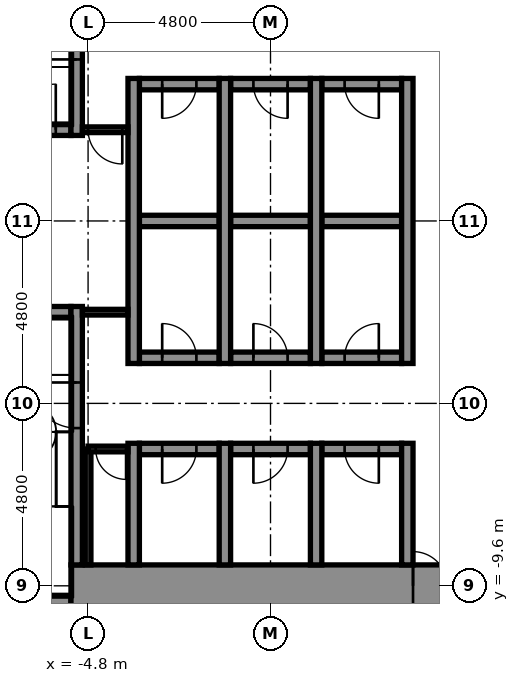
"""IFC4 building model, lengths in metres.
Left out: names, types, materials, properties, quantities, classifications, styles, units other than length and angle.
Written with IfcOpenShell. Run it as: python <this file> out.ifc"""

import sys

from ifc_helpers import new_model, si_unit, direction, frame, frame_2d, origin, place, context, subcontext, project, spatial, rectangle, extrude, element, fill, save


model = new_model("IFC4")
c1 = context("Model", 3, precision=1e-05, world=origin(), true_north=direction((0.0, 1.0)))
c2 = subcontext(c1, "Body", "Model", "MODEL_VIEW")
j1 = project(units=[si_unit("LENGTHUNIT", "METRE"), si_unit("PLANEANGLEUNIT", "RADIAN")], contexts=[c1])
p1 = place(None, origin())
s1 = spatial("IfcSite", under=j1, at=p1, CompositionType="ELEMENT")
p2 = place(p1, origin())
s2 = spatial("IfcBuilding", under=s1, at=p2, CompositionType="ELEMENT")
p3 = place(p2, frame((0.0, 0.0, 7.0)))
s3 = spatial("IfcBuildingStorey", under=s2, at=p3, CompositionType="ELEMENT", Elevation=7.0)
p4 = place(p3, frame((-9.05, -10.0, -0.3), z_axis=(0.0, 0.0, 1.0), x_axis=(1.0, 0.0, 0.0)))
e1 = element("IfcWall", 1, at=p4, inside=s3, PredefinedType="STANDARD", context=c2, shape_type="SweptSolid", body=[
    extrude(rectangle(XDim=3.8, YDim=0.3, at=frame_2d((1.9, 0.0))), origin(), (0.0, 0.0, 1.0), 5.4),
])
p5 = place(p3, frame((-5.25, -9.6, -0.3), z_axis=(0.0, 0.0, 1.0), x_axis=(1.0, 0.0, 0.0)))
e2 = element("IfcWall", 2, at=p5, inside=s3, PredefinedType="SHEAR", context=c2, shape_type="SweptSolid", body=[
    extrude(rectangle(XDim=10.2, YDim=1.1, at=frame_2d((5.1, 0.0))), origin(), (0.0, 0.0, 1.0), 5.4),
])
p6 = place(p5, frame((9.0, 0.0, 0.3)))
e3 = element("IfcOpeningElement", 3, at=p6, cuts=e2, PredefinedType="OPENING", context=c2, shape_type="SweptSolid", body=[
    extrude(rectangle(XDim=0.9, YDim=2.1, at=frame_2d((0.45, 1.05))), frame((0.0, 0.56, 0.0), z_axis=(0.0, -1.0, 0.0), x_axis=(1.0, 0.0, 0.0)), (0.0, 0.0, 1.0), 1.12),
])
p7 = place(p3, frame((-3.45, -6.0, -0.3), z_axis=(0.0, 0.0, 1.0), x_axis=(1.0, 0.0, 0.0)))
e4 = element("IfcWall", 4, at=p7, inside=s3, PredefinedType="STANDARD", context=c2, shape_type="SweptSolid", body=[
    extrude(rectangle(XDim=2.1, YDim=0.3, at=frame_2d((1.05, 0.0))), origin(), (0.0, 0.0, 1.0), 5.4),
])
p8 = place(p7, frame((0.6, 0.0, 0.3)))
e5 = element("IfcOpeningElement", 5, at=p8, cuts=e4, PredefinedType="OPENING", context=c2, shape_type="SweptSolid", body=[
    extrude(rectangle(XDim=0.9, YDim=2.1, at=frame_2d((0.45, 1.05))), frame((0.0, 0.16, 0.0), z_axis=(0.0, -1.0, 0.0), x_axis=(1.0, 0.0, 0.0)), (0.0, 0.0, 1.0), 0.32),
])
p9 = place(p3, frame((-1.05, -6.0, -0.3), z_axis=(0.0, 0.0, 1.0), x_axis=(1.0, 0.0, 0.0)))
e6 = element("IfcWall", 6, at=p9, inside=s3, PredefinedType="STANDARD", context=c2, shape_type="SweptSolid", body=[
    extrude(rectangle(XDim=2.1, YDim=0.3, at=frame_2d((1.05, 0.0))), origin(), (0.0, 0.0, 1.0), 5.4),
])
p10 = place(p9, frame((0.6, 0.0, 0.3)))
e7 = element("IfcOpeningElement", 7, at=p10, cuts=e6, PredefinedType="OPENING", context=c2, shape_type="SweptSolid", body=[
    extrude(rectangle(XDim=0.9, YDim=2.1, at=frame_2d((0.45, 1.05))), frame((0.0, 0.16, 0.0), z_axis=(0.0, -1.0, 0.0), x_axis=(1.0, 0.0, 0.0)), (0.0, 0.0, 1.0), 0.32),
])
p11 = place(p3, frame((1.35, -6.0, -0.3), z_axis=(0.0, 0.0, 1.0), x_axis=(1.0, 0.0, 0.0)))
e8 = element("IfcWall", 8, at=p11, inside=s3, PredefinedType="STANDARD", context=c2, shape_type="SweptSolid", body=[
    extrude(rectangle(XDim=2.1, YDim=0.3, at=frame_2d((1.05, 0.0))), origin(), (0.0, 0.0, 1.0), 5.4),
])
p12 = place(p11, frame((0.6, 0.0, 0.3)))
e9 = element("IfcOpeningElement", 9, at=p12, cuts=e8, PredefinedType="OPENING", context=c2, shape_type="SweptSolid", body=[
    extrude(rectangle(XDim=0.9, YDim=2.1, at=frame_2d((0.45, 1.05))), frame((0.0, 0.16, 0.0), z_axis=(0.0, -1.0, 0.0), x_axis=(1.0, 0.0, 0.0)), (0.0, 0.0, 1.0), 0.32),
])
p13 = place(p3, frame((-3.45, -3.6, -0.3), z_axis=(0.0, 0.0, 1.0), x_axis=(1.0, 0.0, 0.0)))
e10 = element("IfcWall", 10, at=p13, inside=s3, PredefinedType="STANDARD", context=c2, shape_type="SweptSolid", body=[
    extrude(rectangle(XDim=2.1, YDim=0.3, at=frame_2d((1.05, 0.0))), origin(), (0.0, 0.0, 1.0), 5.4),
])
p14 = place(p13, frame((0.6, 0.0, 0.3)))
e11 = element("IfcOpeningElement", 11, at=p14, cuts=e10, PredefinedType="OPENING", context=c2, shape_type="SweptSolid", body=[
    extrude(rectangle(XDim=0.9, YDim=2.1, at=frame_2d((0.45, 1.05))), frame((0.0, 0.16, 0.0), z_axis=(0.0, -1.0, 0.0), x_axis=(1.0, 0.0, 0.0)), (0.0, 0.0, 1.0), 0.32),
])
p15 = place(p3, frame((-1.05, -3.6, -0.3), z_axis=(0.0, 0.0, 1.0), x_axis=(1.0, 0.0, 0.0)))
e12 = element("IfcWall", 12, at=p15, inside=s3, PredefinedType="STANDARD", context=c2, shape_type="SweptSolid", body=[
    extrude(rectangle(XDim=2.1, YDim=0.3, at=frame_2d((1.05, 0.0))), origin(), (0.0, 0.0, 1.0), 5.4),
])
p16 = place(p15, frame((0.6, 0.0, 0.3)))
e13 = element("IfcOpeningElement", 13, at=p16, cuts=e12, PredefinedType="OPENING", context=c2, shape_type="SweptSolid", body=[
    extrude(rectangle(XDim=0.9, YDim=2.1, at=frame_2d((0.45, 1.05))), frame((0.0, 0.16, 0.0), z_axis=(0.0, -1.0, 0.0), x_axis=(1.0, 0.0, 0.0)), (0.0, 0.0, 1.0), 0.32),
])
p17 = place(p3, frame((1.35, -3.6, -0.3), z_axis=(0.0, 0.0, 1.0), x_axis=(1.0, 0.0, 0.0)))
e14 = element("IfcWall", 14, at=p17, inside=s3, PredefinedType="STANDARD", context=c2, shape_type="SweptSolid", body=[
    extrude(rectangle(XDim=2.1, YDim=0.3, at=frame_2d((1.05, 0.0))), origin(), (0.0, 0.0, 1.0), 5.4),
])
p18 = place(p17, frame((0.6, 0.0, 0.3)))
e15 = element("IfcOpeningElement", 15, at=p18, cuts=e14, PredefinedType="OPENING", context=c2, shape_type="SweptSolid", body=[
    extrude(rectangle(XDim=0.9, YDim=2.1, at=frame_2d((0.45, 1.05))), frame((0.0, 0.16, 0.0), z_axis=(0.0, -1.0, 0.0), x_axis=(1.0, 0.0, 0.0)), (0.0, 0.0, 1.0), 0.32),
])
p19 = place(p3, frame((-7.25, -2.4, -0.3), z_axis=(0.0, 0.0, 1.0), x_axis=(1.0, 0.0, 0.0)))
e16 = element("IfcWall", 16, at=p19, inside=s3, PredefinedType="STANDARD", context=c2, shape_type="SweptSolid", body=[
    extrude(rectangle(XDim=2.0, YDim=0.3, at=frame_2d((1.0, 0.0))), origin(), (0.0, 0.0, 1.0), 5.4),
])
p20 = place(p3, frame((-3.45, 0.0, -0.3), z_axis=(0.0, 0.0, 1.0), x_axis=(1.0, 0.0, 0.0)))
e17 = element("IfcWall", 17, at=p20, inside=s3, PredefinedType="STANDARD", context=c2, shape_type="SweptSolid", body=[
    extrude(rectangle(XDim=2.1, YDim=0.3, at=frame_2d((1.05, 0.0))), origin(), (0.0, 0.0, 1.0), 5.4),
])
p21 = place(p3, frame((-1.05, 0.0, -0.3), z_axis=(0.0, 0.0, 1.0), x_axis=(1.0, 0.0, 0.0)))
e18 = element("IfcWall", 18, at=p21, inside=s3, PredefinedType="STANDARD", context=c2, shape_type="SweptSolid", body=[
    extrude(rectangle(XDim=2.1, YDim=0.3, at=frame_2d((1.05, 0.0))), origin(), (0.0, 0.0, 1.0), 5.4),
])
p22 = place(p3, frame((1.35, 0.0, -0.3), z_axis=(0.0, 0.0, 1.0), x_axis=(1.0, 0.0, 0.0)))
e19 = element("IfcWall", 19, at=p22, inside=s3, PredefinedType="STANDARD", context=c2, shape_type="SweptSolid", body=[
    extrude(rectangle(XDim=2.1, YDim=0.3, at=frame_2d((1.05, 0.0))), origin(), (0.0, 0.0, 1.0), 5.4),
])
p23 = place(p3, frame((-7.25, 2.4, -0.3), z_axis=(0.0, 0.0, 1.0), x_axis=(1.0, 0.0, 0.0)))
e20 = element("IfcWall", 20, at=p23, inside=s3, PredefinedType="STANDARD", context=c2, shape_type="SweptSolid", body=[
    extrude(rectangle(XDim=2.0, YDim=0.3, at=frame_2d((1.0, 0.0))), origin(), (0.0, 0.0, 1.0), 5.4),
])
p24 = place(p23, frame((0.4, 0.0, 0.3)))
e21 = element("IfcOpeningElement", 21, at=p24, cuts=e20, PredefinedType="OPENING", context=c2, shape_type="SweptSolid", body=[
    extrude(rectangle(XDim=1.2, YDim=2.1, at=frame_2d((0.6, 1.05))), frame((0.0, 0.16, 0.0), z_axis=(0.0, -1.0, 0.0), x_axis=(1.0, 0.0, 0.0)), (0.0, 0.0, 1.0), 0.32),
])
p25 = place(p3, frame((-3.45, 3.6, -0.3), z_axis=(0.0, 0.0, 1.0), x_axis=(1.0, 0.0, 0.0)))
e22 = element("IfcWall", 22, at=p25, inside=s3, PredefinedType="STANDARD", context=c2, shape_type="SweptSolid", body=[
    extrude(rectangle(XDim=2.1, YDim=0.3, at=frame_2d((1.05, 0.0))), origin(), (0.0, 0.0, 1.0), 5.4),
])
p26 = place(p25, frame((0.6, 0.0, 0.3)))
e23 = element("IfcOpeningElement", 23, at=p26, cuts=e22, PredefinedType="OPENING", context=c2, shape_type="SweptSolid", body=[
    extrude(rectangle(XDim=0.9, YDim=2.1, at=frame_2d((0.45, 1.05))), frame((0.0, 0.16, 0.0), z_axis=(0.0, -1.0, 0.0), x_axis=(1.0, 0.0, 0.0)), (0.0, 0.0, 1.0), 0.32),
])
p27 = place(p3, frame((-1.05, 3.6, -0.3), z_axis=(0.0, 0.0, 1.0), x_axis=(1.0, 0.0, 0.0)))
e24 = element("IfcWall", 24, at=p27, inside=s3, PredefinedType="STANDARD", context=c2, shape_type="SweptSolid", body=[
    extrude(rectangle(XDim=2.1, YDim=0.3, at=frame_2d((1.05, 0.0))), origin(), (0.0, 0.0, 1.0), 5.4),
])
p28 = place(p27, frame((0.6, 0.0, 0.3)))
e25 = element("IfcOpeningElement", 25, at=p28, cuts=e24, PredefinedType="OPENING", context=c2, shape_type="SweptSolid", body=[
    extrude(rectangle(XDim=0.9, YDim=2.1, at=frame_2d((0.45, 1.05))), frame((0.0, 0.16, 0.0), z_axis=(0.0, -1.0, 0.0), x_axis=(1.0, 0.0, 0.0)), (0.0, 0.0, 1.0), 0.32),
])
p29 = place(p3, frame((1.35, 3.6, -0.3), z_axis=(0.0, 0.0, 1.0), x_axis=(1.0, 0.0, 0.0)))
e26 = element("IfcWall", 26, at=p29, inside=s3, PredefinedType="STANDARD", context=c2, shape_type="SweptSolid", body=[
    extrude(rectangle(XDim=2.1, YDim=0.3, at=frame_2d((1.05, 0.0))), origin(), (0.0, 0.0, 1.0), 5.4),
])
p30 = place(p29, frame((0.6, 0.0, 0.3)))
e27 = element("IfcOpeningElement", 27, at=p30, cuts=e26, PredefinedType="OPENING", context=c2, shape_type="SweptSolid", body=[
    extrude(rectangle(XDim=0.9, YDim=2.1, at=frame_2d((0.45, 1.05))), frame((0.0, 0.16, 0.0), z_axis=(0.0, -1.0, 0.0), x_axis=(1.0, 0.0, 0.0)), (0.0, 0.0, 1.0), 0.32),
])
p31 = place(p3, frame((-5.1, -9.05, -0.3), z_axis=(0.0, 0.0, 1.0), x_axis=(0.0, 1.0, 0.0)))
e28 = element("IfcWall", 28, at=p31, inside=s3, PredefinedType="STANDARD", context=c2, shape_type="SweptSolid", body=[
    extrude(rectangle(XDim=6.8, YDim=0.3, at=frame_2d((3.4, 0.0))), origin(), (0.0, 0.0, 1.0), 5.4),
])
p32 = place(p31, frame((3.6, 0.0, 0.3)))
e29 = element("IfcOpeningElement", 29, at=p32, cuts=e28, PredefinedType="OPENING", context=c2, shape_type="SweptSolid", body=[
    extrude(rectangle(XDim=1.2, YDim=2.1, at=frame_2d((0.6, 1.05))), frame((0.0, 0.16, 0.0), z_axis=(0.0, -1.0, 0.0), x_axis=(1.0, 0.0, 0.0)), (0.0, 0.0, 1.0), 0.32),
])
p33 = place(p3, frame((-5.1, 2.25, -0.3), z_axis=(0.0, 0.0, 1.0), x_axis=(0.0, 1.0, 0.0)))
e30 = element("IfcWall", 30, at=p33, inside=s3, PredefinedType="STANDARD", context=c2, shape_type="SweptSolid", body=[
    extrude(rectangle(XDim=6.8, YDim=0.3, at=frame_2d((3.4, 0.0))), origin(), (0.0, 0.0, 1.0), 5.4),
])
p34 = place(p33, frame((2.0, 0.0, 0.3)))
e31 = element("IfcOpeningElement", 31, at=p34, cuts=e30, PredefinedType="OPENING", context=c2, shape_type="SweptSolid", body=[
    extrude(rectangle(XDim=1.2, YDim=2.1, at=frame_2d((0.6, 1.05))), frame((0.0, 0.16, 0.0), z_axis=(0.0, -1.0, 0.0), x_axis=(1.0, 0.0, 0.0)), (0.0, 0.0, 1.0), 0.32),
])
p35 = place(p3, frame((-3.6, -9.05, -0.3), z_axis=(0.0, 0.0, 1.0), x_axis=(0.0, 1.0, 0.0)))
e32 = element("IfcWall", 32, at=p35, inside=s3, PredefinedType="STANDARD", context=c2, shape_type="SweptSolid", body=[
    extrude(rectangle(XDim=3.2, YDim=0.3, at=frame_2d((1.6, 0.0))), origin(), (0.0, 0.0, 1.0), 5.4),
])
p36 = place(p3, frame((-3.6, -3.75, -0.3), z_axis=(0.0, 0.0, 1.0), x_axis=(0.0, 1.0, 0.0)))
e33 = element("IfcWall", 33, at=p36, inside=s3, PredefinedType="STANDARD", context=c2, shape_type="SweptSolid", body=[
    extrude(rectangle(XDim=7.5, YDim=0.3, at=frame_2d((3.75, 0.0))), origin(), (0.0, 0.0, 1.0), 5.4),
])
p37 = place(p3, frame((-1.2, -9.05, -0.3), z_axis=(0.0, 0.0, 1.0), x_axis=(0.0, 1.0, 0.0)))
e34 = element("IfcWall", 34, at=p37, inside=s3, PredefinedType="STANDARD", context=c2, shape_type="SweptSolid", body=[
    extrude(rectangle(XDim=3.2, YDim=0.3, at=frame_2d((1.6, 0.0))), origin(), (0.0, 0.0, 1.0), 5.4),
])
p38 = place(p3, frame((-1.2, -3.75, -0.3), z_axis=(0.0, 0.0, 1.0), x_axis=(0.0, 1.0, 0.0)))
e35 = element("IfcWall", 35, at=p38, inside=s3, PredefinedType="STANDARD", context=c2, shape_type="SweptSolid", body=[
    extrude(rectangle(XDim=7.5, YDim=0.3, at=frame_2d((3.75, 0.0))), origin(), (0.0, 0.0, 1.0), 5.4),
])
p39 = place(p3, frame((1.2, -9.05, -0.3), z_axis=(0.0, 0.0, 1.0), x_axis=(0.0, 1.0, 0.0)))
e36 = element("IfcWall", 36, at=p39, inside=s3, PredefinedType="STANDARD", context=c2, shape_type="SweptSolid", body=[
    extrude(rectangle(XDim=3.2, YDim=0.3, at=frame_2d((1.6, 0.0))), origin(), (0.0, 0.0, 1.0), 5.4),
])
p40 = place(p3, frame((1.2, -3.75, -0.3), z_axis=(0.0, 0.0, 1.0), x_axis=(0.0, 1.0, 0.0)))
e37 = element("IfcWall", 37, at=p40, inside=s3, PredefinedType="STANDARD", context=c2, shape_type="SweptSolid", body=[
    extrude(rectangle(XDim=7.5, YDim=0.3, at=frame_2d((3.75, 0.0))), origin(), (0.0, 0.0, 1.0), 5.4),
])
p41 = place(p3, frame((3.6, -9.05, -0.3), z_axis=(0.0, 0.0, 1.0), x_axis=(0.0, 1.0, 0.0)))
e38 = element("IfcWall", 38, at=p41, inside=s3, PredefinedType="STANDARD", context=c2, shape_type="SweptSolid", body=[
    extrude(rectangle(XDim=3.2, YDim=0.3, at=frame_2d((1.6, 0.0))), origin(), (0.0, 0.0, 1.0), 5.4),
])
p42 = place(p3, frame((3.6, -3.75, -0.3), z_axis=(0.0, 0.0, 1.0), x_axis=(0.0, 1.0, 0.0)))
e39 = element("IfcWall", 39, at=p42, inside=s3, PredefinedType="STANDARD", context=c2, shape_type="SweptSolid", body=[
    extrude(rectangle(XDim=7.5, YDim=0.3, at=frame_2d((3.75, 0.0))), origin(), (0.0, 0.0, 1.0), 5.4),
])
p43 = place(p3, frame((-4.8, -9.05, 0.0), z_axis=(0.0, 0.0, 1.0), x_axis=(0.0, 1.0, 0.0)))
e40 = element("IfcWall", 40, at=p43, inside=s3, PredefinedType="PARTITIONING", context=c2, shape_type="SweptSolid", body=[
    extrude(rectangle(XDim=3.05, YDim=0.15, at=frame_2d((1.525, 0.0))), origin(), (0.0, 0.0, 1.0), 5.1),
])
p44 = place(p3, frame((-4.8, -6.0, 0.0), z_axis=(0.0, 0.0, 1.0), x_axis=(1.0, 0.0, 0.0)))
e41 = element("IfcWall", 41, at=p44, inside=s3, PredefinedType="PARTITIONING", context=c2, shape_type="SweptSolid", body=[
    extrude(rectangle(XDim=1.05, YDim=0.15, at=frame_2d((0.525, 0.0))), origin(), (0.0, 0.0, 1.0), 5.1),
])
p45 = place(p44, frame((0.2, 0.0, 0.0)))
e42 = element("IfcOpeningElement", 42, at=p45, cuts=e41, PredefinedType="OPENING", context=c2, shape_type="SweptSolid", body=[
    extrude(rectangle(XDim=0.8, YDim=2.1, at=frame_2d((0.4, 1.05))), frame((0.0, 0.085, 0.0), z_axis=(0.0, -1.0, 0.0), x_axis=(1.0, 0.0, 0.0)), (0.0, 0.0, 1.0), 0.17),
])
p46 = place(p3, frame((-4.95, 2.4, 0.0), z_axis=(0.0, 0.0, 1.0), x_axis=(1.0, 0.0, 0.0)))
e43 = element("IfcWall", 43, at=p46, inside=s3, PredefinedType="PARTITIONING", context=c2, shape_type="SweptSolid", body=[
    extrude(rectangle(XDim=1.2, YDim=0.15, at=frame_2d((0.6, 0.0))), origin(), (0.0, 0.0, 1.0), 5.1),
])
p47 = place(p46, frame((0.15, 0.0, 0.0)))
e44 = element("IfcOpeningElement", 44, at=p47, cuts=e43, PredefinedType="OPENING", context=c2, shape_type="SweptSolid", body=[
    extrude(rectangle(XDim=0.9, YDim=2.1, at=frame_2d((0.45, 1.05))), frame((0.0, 0.085, 0.0), z_axis=(0.0, -1.0, 0.0), x_axis=(1.0, 0.0, 0.0)), (0.0, 0.0, 1.0), 0.17),
])
p48 = place(p3, frame((-4.95, -2.4, 0.0), z_axis=(0.0, 0.0, 1.0), x_axis=(1.0, 0.0, 0.0)))
e45 = element("IfcWall", 45, at=p48, inside=s3, PredefinedType="PARTITIONING", context=c2, shape_type="SweptSolid", body=[
    extrude(rectangle(XDim=1.2, YDim=0.15, at=frame_2d((0.6, 0.0))), origin(), (0.0, 0.0, 1.0), 5.1),
])
p49 = place(p45, frame((0.8, 0.0, 0.0), z_axis=(0.0, 0.0, 1.0), x_axis=(-1.0, 0.0, 0.0)))
e46 = element("IfcDoor", 46, at=p49, inside=s3, OperationType="SINGLE_SWING_RIGHT", PredefinedType="DOOR", context=c2, shape_type="SweptSolid", body=[
    extrude(rectangle(XDim=0.8, YDim=2.1, at=frame_2d((0.4, 1.05))), frame((0.0, 0.025, 0.0), z_axis=(0.0, -1.0, 0.0), x_axis=(1.0, 0.0, 0.0)), (0.0, 0.0, 1.0), 0.05),
])
fill(e42, e46)
p50 = place(p34, origin())
e47 = element("IfcDoor", 47, at=p50, inside=s3, OperationType="SINGLE_SWING_LEFT", PredefinedType="DOOR", context=c2, shape_type="SweptSolid", body=[
    extrude(rectangle(XDim=1.2, YDim=2.1, at=frame_2d((0.6, 1.05))), frame((0.0, 0.025, 0.0), z_axis=(0.0, -1.0, 0.0), x_axis=(1.0, 0.0, 0.0)), (0.0, 0.0, 1.0), 0.05),
])
fill(e31, e47)
p51 = place(p32, origin())
e48 = element("IfcDoor", 48, at=p51, inside=s3, OperationType="SINGLE_SWING_RIGHT", PredefinedType="DOOR", context=c2, shape_type="SweptSolid", body=[
    extrude(rectangle(XDim=1.2, YDim=2.1, at=frame_2d((0.6, 1.05))), frame((0.0, 0.025, 0.0), z_axis=(0.0, -1.0, 0.0), x_axis=(1.0, 0.0, 0.0)), (0.0, 0.0, 1.0), 0.05),
])
fill(e29, e48)
p52 = place(p26, frame((0.9, 0.0, 0.0), z_axis=(0.0, 0.0, 1.0), x_axis=(-1.0, 0.0, 0.0)))
e49 = element("IfcDoor", 49, at=p52, inside=s3, OperationType="SINGLE_SWING_LEFT", PredefinedType="DOOR", context=c2, shape_type="SweptSolid", body=[
    extrude(rectangle(XDim=0.9, YDim=2.1, at=frame_2d((0.45, 1.05))), frame((0.0, 0.025, 0.0), z_axis=(0.0, -1.0, 0.0), x_axis=(1.0, 0.0, 0.0)), (0.0, 0.0, 1.0), 0.05),
])
fill(e23, e49)
p53 = place(p28, frame((0.9, 0.0, 0.0), z_axis=(0.0, 0.0, 1.0), x_axis=(-1.0, 0.0, 0.0)))
e50 = element("IfcDoor", 50, at=p53, inside=s3, OperationType="SINGLE_SWING_RIGHT", PredefinedType="DOOR", context=c2, shape_type="SweptSolid", body=[
    extrude(rectangle(XDim=0.9, YDim=2.1, at=frame_2d((0.45, 1.05))), frame((0.0, 0.025, 0.0), z_axis=(0.0, -1.0, 0.0), x_axis=(1.0, 0.0, 0.0)), (0.0, 0.0, 1.0), 0.05),
])
fill(e25, e50)
p54 = place(p30, frame((0.9, 0.0, 0.0), z_axis=(0.0, 0.0, 1.0), x_axis=(-1.0, 0.0, 0.0)))
e51 = element("IfcDoor", 51, at=p54, inside=s3, OperationType="SINGLE_SWING_RIGHT", PredefinedType="DOOR", context=c2, shape_type="SweptSolid", body=[
    extrude(rectangle(XDim=0.9, YDim=2.1, at=frame_2d((0.45, 1.05))), frame((0.0, 0.025, 0.0), z_axis=(0.0, -1.0, 0.0), x_axis=(1.0, 0.0, 0.0)), (0.0, 0.0, 1.0), 0.05),
])
fill(e27, e51)
p55 = place(p14, origin())
e52 = element("IfcDoor", 52, at=p55, inside=s3, OperationType="SINGLE_SWING_LEFT", PredefinedType="DOOR", context=c2, shape_type="SweptSolid", body=[
    extrude(rectangle(XDim=0.9, YDim=2.1, at=frame_2d((0.45, 1.05))), frame((0.0, 0.025, 0.0), z_axis=(0.0, -1.0, 0.0), x_axis=(1.0, 0.0, 0.0)), (0.0, 0.0, 1.0), 0.05),
])
fill(e11, e52)
p56 = place(p16, origin())
e53 = element("IfcDoor", 53, at=p56, inside=s3, OperationType="SINGLE_SWING_LEFT", PredefinedType="DOOR", context=c2, shape_type="SweptSolid", body=[
    extrude(rectangle(XDim=0.9, YDim=2.1, at=frame_2d((0.45, 1.05))), frame((0.0, 0.025, 0.0), z_axis=(0.0, -1.0, 0.0), x_axis=(1.0, 0.0, 0.0)), (0.0, 0.0, 1.0), 0.05),
])
fill(e13, e53)
p57 = place(p18, origin())
e54 = element("IfcDoor", 54, at=p57, inside=s3, OperationType="SINGLE_SWING_RIGHT", PredefinedType="DOOR", context=c2, shape_type="SweptSolid", body=[
    extrude(rectangle(XDim=0.9, YDim=2.1, at=frame_2d((0.45, 1.05))), frame((0.0, 0.025, 0.0), z_axis=(0.0, -1.0, 0.0), x_axis=(1.0, 0.0, 0.0)), (0.0, 0.0, 1.0), 0.05),
])
fill(e15, e54)
p58 = place(p8, frame((0.9, 0.0, 0.0), z_axis=(0.0, 0.0, 1.0), x_axis=(-1.0, 0.0, 0.0)))
e55 = element("IfcDoor", 55, at=p58, inside=s3, OperationType="SINGLE_SWING_LEFT", PredefinedType="DOOR", context=c2, shape_type="SweptSolid", body=[
    extrude(rectangle(XDim=0.9, YDim=2.1, at=frame_2d((0.45, 1.05))), frame((0.0, 0.025, 0.0), z_axis=(0.0, -1.0, 0.0), x_axis=(1.0, 0.0, 0.0)), (0.0, 0.0, 1.0), 0.05),
])
fill(e5, e55)
p59 = place(p10, frame((0.9, 0.0, 0.0), z_axis=(0.0, 0.0, 1.0), x_axis=(-1.0, 0.0, 0.0)))
e56 = element("IfcDoor", 56, at=p59, inside=s3, OperationType="SINGLE_SWING_LEFT", PredefinedType="DOOR", context=c2, shape_type="SweptSolid", body=[
    extrude(rectangle(XDim=0.9, YDim=2.1, at=frame_2d((0.45, 1.05))), frame((0.0, 0.025, 0.0), z_axis=(0.0, -1.0, 0.0), x_axis=(1.0, 0.0, 0.0)), (0.0, 0.0, 1.0), 0.05),
])
fill(e7, e56)
p60 = place(p12, frame((0.9, 0.0, 0.0), z_axis=(0.0, 0.0, 1.0), x_axis=(-1.0, 0.0, 0.0)))
e57 = element("IfcDoor", 57, at=p60, inside=s3, OperationType="SINGLE_SWING_RIGHT", PredefinedType="DOOR", context=c2, shape_type="SweptSolid", body=[
    extrude(rectangle(XDim=0.9, YDim=2.1, at=frame_2d((0.45, 1.05))), frame((0.0, 0.025, 0.0), z_axis=(0.0, -1.0, 0.0), x_axis=(1.0, 0.0, 0.0)), (0.0, 0.0, 1.0), 0.05),
])
fill(e9, e57)
p61 = place(p6, origin())
e58 = element("IfcDoor", 58, at=p61, inside=s3, OperationType="SINGLE_SWING_LEFT", PredefinedType="DOOR", context=c2, shape_type="SweptSolid", body=[
    extrude(rectangle(XDim=0.9, YDim=2.1, at=frame_2d((0.45, 1.05))), frame((0.0, 0.025, 0.0), z_axis=(0.0, -1.0, 0.0), x_axis=(1.0, 0.0, 0.0)), (0.0, 0.0, 1.0), 0.05),
])
fill(e3, e58)
p62 = place(p47, frame((0.9, 0.0, 0.0), z_axis=(0.0, 0.0, 1.0), x_axis=(-1.0, 0.0, 0.0)))
e59 = element("IfcDoor", 59, at=p62, inside=s3, OperationType="SINGLE_SWING_RIGHT", PredefinedType="DOOR", context=c2, shape_type="SweptSolid", body=[
    extrude(rectangle(XDim=0.9, YDim=2.1, at=frame_2d((0.45, 1.05))), frame((0.0, 0.025, 0.0), z_axis=(0.0, -1.0, 0.0), x_axis=(1.0, 0.0, 0.0)), (0.0, 0.0, 1.0), 0.05),
])
fill(e44, e59)
p63 = place(p24, origin())
e60 = element("IfcDoor", 60, at=p63, inside=s3, OperationType="SINGLE_SWING_RIGHT", PredefinedType="DOOR", context=c2, shape_type="SweptSolid", body=[
    extrude(rectangle(XDim=1.2, YDim=2.1, at=frame_2d((0.6, 1.05))), frame((0.0, 0.025, 0.0), z_axis=(0.0, -1.0, 0.0), x_axis=(1.0, 0.0, 0.0)), (0.0, 0.0, 1.0), 0.05),
])
fill(e21, e60)
save(model, sys.argv[1])
